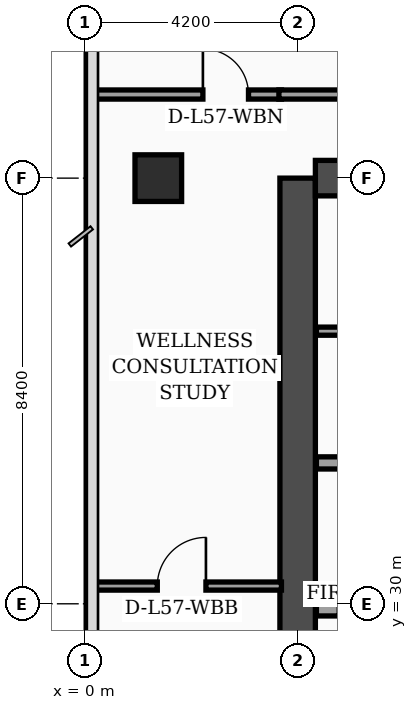
"""IFC4 building model, lengths in metres.
Left out: names, types, materials, properties, quantities, classifications, styles, units other than length and angle.
Written with IfcOpenShell. Run it as: python <this file> out.ifc"""

import sys

from ifc_helpers import new_model, si_unit, direction, frame, frame_2d, origin, origin_2d, place, context, subcontext, project, spatial, rectangle, extrude, element, fill, save


model = new_model("IFC4")
c1 = context("Model", 3, precision=1e-05, world=origin(), true_north=direction((0.0, 1.0)))
c2 = subcontext(c1, "Body", "Model", "MODEL_VIEW")
j1 = project(units=[si_unit("LENGTHUNIT", "METRE"), si_unit("PLANEANGLEUNIT", "RADIAN")], contexts=[c1])
p1 = place(None, origin())
s1 = spatial("IfcSite", under=j1, at=p1, CompositionType="ELEMENT")
p2 = place(p1, origin())
s2 = spatial("IfcBuilding", under=s1, at=p2, CompositionType="ELEMENT")
p3 = place(p2, frame((0.0, 0.0, 230.7)))
s3 = spatial("IfcBuildingStorey", under=s2, at=p3, CompositionType="ELEMENT", Elevation=230.7)
p4 = place(p3, frame((4.2, 16.8, 0.0), z_axis=(0.0, 0.0, 1.0), x_axis=(0.0, 1.0, 0.0)))
e1 = element("IfcWall", 1, at=p4, inside=s3, PredefinedType="SHEAR", context=c2, shape_type="SweptSolid", body=[
    extrude(rectangle(XDim=21.6, YDim=0.7, at=frame_2d((10.8, 0.0))), origin(), (0.0, 0.0, 1.0), 3.52),
])
p5 = place(p3, frame((4.55, 38.4, 0.0), z_axis=(0.0, 0.0, 1.0), x_axis=(1.0, 0.0, 0.0)))
e2 = element("IfcWall", 2, at=p5, inside=s3, PredefinedType="SHEAR", context=c2, shape_type="SweptSolid", body=[
    extrude(rectangle(XDim=10.1, YDim=0.7, at=frame_2d((5.05, 0.0))), origin(), (0.0, 0.0, 1.0), 3.52),
])
p6 = place(p3, frame((1.45, 38.4, 0.0), z_axis=(0.0, 0.0, 1.0), x_axis=(1.0, 0.0, 0.0)))
e3 = element("IfcColumn", 3, at=p6, inside=s3, PredefinedType="COLUMN", context=c2, shape_type="SweptSolid", body=[
    extrude(rectangle(XDim=0.92, YDim=0.92, at=origin_2d()), origin(), (0.0, 0.0, 1.0), 3.52),
])
p7 = place(p3, frame((4.57, 29.88, 0.0), z_axis=(0.0, 0.0, 1.0), x_axis=(1.0, 0.0, 0.0)))
e4 = element("IfcWall", 4, at=p7, inside=s3, PredefinedType="SOLIDWALL", context=c2, shape_type="SweptSolid", body=[
    extrude(rectangle(XDim=4.85, YDim=0.24, at=frame_2d((2.425, 0.0))), origin(), (0.0, 0.0, 1.0), 3.52),
])
p8 = place(p7, frame((0.45, 0.0, 0.0)))
e5 = element("IfcOpeningElement", 5, at=p8, cuts=e4, PredefinedType="OPENING", context=c2, shape_type="SweptSolid", body=[
    extrude(rectangle(XDim=1.3, YDim=2.35, at=frame_2d((0.65, 1.175))), frame((0.0, 0.13, 0.0), z_axis=(0.0, -1.0, 0.0), x_axis=(1.0, 0.0, 0.0)), (0.0, 0.0, 1.0), 0.26),
])
p9 = place(p3, frame((4.57, 32.78, 0.0), z_axis=(0.0, 0.0, 1.0), x_axis=(1.0, 0.0, 0.0)))
e6 = element("IfcWall", 6, at=p9, inside=s3, PredefinedType="SOLIDWALL", context=c2, shape_type="SweptSolid", body=[
    extrude(rectangle(XDim=4.85, YDim=0.24, at=frame_2d((2.425, 0.0))), origin(), (0.0, 0.0, 1.0), 3.17),
])
p10 = place(p3, frame((4.57, 35.38, 0.0), z_axis=(0.0, 0.0, 1.0), x_axis=(1.0, 0.0, 0.0)))
e7 = element("IfcWall", 7, at=p10, inside=s3, PredefinedType="PARTITIONING", context=c2, shape_type="SweptSolid", body=[
    extrude(rectangle(XDim=4.85, YDim=0.16, at=frame_2d((2.425, 0.0))), origin(), (0.0, 0.0, 1.0), 3.52),
])
p11 = place(p10, frame((1.3, 0.0, 0.0)))
e8 = element("IfcOpeningElement", 8, at=p11, cuts=e7, PredefinedType="OPENING", context=c2, shape_type="SweptSolid", body=[
    extrude(rectangle(XDim=0.98, YDim=2.15, at=frame_2d((0.49, 1.075))), frame((0.0, 0.09, 0.0), z_axis=(0.0, -1.0, 0.0), x_axis=(1.0, 0.0, 0.0)), (0.0, 0.0, 1.0), 0.18),
])
p12 = place(p3, frame((0.08, 30.35, 0.0), z_axis=(0.0, 0.0, 1.0), x_axis=(1.0, 0.0, 0.0)))
e9 = element("IfcWall", 9, at=p12, inside=s3, PredefinedType="PARTITIONING", context=c2, shape_type="SweptSolid", body=[
    extrude(rectangle(XDim=3.8, YDim=0.16, at=frame_2d((1.9, 0.0))), origin(), (0.0, 0.0, 1.0), 3.07),
])
p13 = place(p12, frame((1.35, 0.0, 0.0)))
e10 = element("IfcOpeningElement", 10, at=p13, cuts=e9, PredefinedType="OPENING", context=c2, shape_type="SweptSolid", body=[
    extrude(rectangle(XDim=0.96, YDim=2.2, at=frame_2d((0.48, 1.1))), frame((0.0, 0.09, 0.0), z_axis=(0.0, -1.0, 0.0), x_axis=(1.0, 0.0, 0.0)), (0.0, 0.0, 1.0), 0.18),
])
p14 = place(p3, frame((0.08, 40.05, 0.0), z_axis=(0.0, 0.0, 1.0), x_axis=(1.0, 0.0, 0.0)))
e11 = element("IfcWall", 11, at=p14, inside=s3, PredefinedType="PARTITIONING", context=c2, shape_type="SweptSolid", body=[
    extrude(rectangle(XDim=3.8, YDim=0.18, at=frame_2d((1.9, 0.0))), origin(), (0.0, 0.0, 1.0), 2.92),
])
p15 = place(p14, frame((2.25, 0.0, 0.0)))
e12 = element("IfcOpeningElement", 12, at=p15, cuts=e11, PredefinedType="OPENING", context=c2, shape_type="SweptSolid", body=[
    extrude(rectangle(XDim=0.9, YDim=2.15, at=frame_2d((0.45, 1.075))), frame((0.0, 0.1, 0.0), z_axis=(0.0, -1.0, 0.0), x_axis=(1.0, 0.0, 0.0)), (0.0, 0.0, 1.0), 0.2),
])
p16 = place(p3, frame((3.83, 40.05, 0.0), z_axis=(0.0, 0.0, 1.0), x_axis=(1.0, 0.0, 0.0)))
e13 = element("IfcWall", 13, at=p16, inside=s3, PredefinedType="PARTITIONING", context=c2, shape_type="SweptSolid", body=[
    extrude(rectangle(XDim=11.32, YDim=0.18, at=frame_2d((5.66, 0.0))), origin(), (0.0, 0.0, 1.0), 2.92),
])
p17 = place(p13, origin())
e14 = element("IfcDoor", 14, at=p17, inside=s3, OperationType="SINGLE_SWING_RIGHT", PredefinedType="DOOR", context=c2, shape_type="SweptSolid", body=[
    extrude(rectangle(XDim=0.96, YDim=2.2, at=frame_2d((0.48, 1.1))), frame((0.0, 0.025, 0.0), z_axis=(0.0, -1.0, 0.0), x_axis=(1.0, 0.0, 0.0)), (0.0, 0.0, 1.0), 0.05),
])
fill(e10, e14)
p18 = place(p15, origin())
e15 = element("IfcDoor", 15, at=p18, inside=s3, OperationType="SINGLE_SWING_LEFT", PredefinedType="DOOR", context=c2, shape_type="SweptSolid", body=[
    extrude(rectangle(XDim=0.9, YDim=2.15, at=frame_2d((0.45, 1.075))), frame((0.0, 0.025, 0.0), z_axis=(0.0, -1.0, 0.0), x_axis=(1.0, 0.0, 0.0)), (0.0, 0.0, 1.0), 0.05),
])
fill(e12, e15)
save(model, sys.argv[1])
